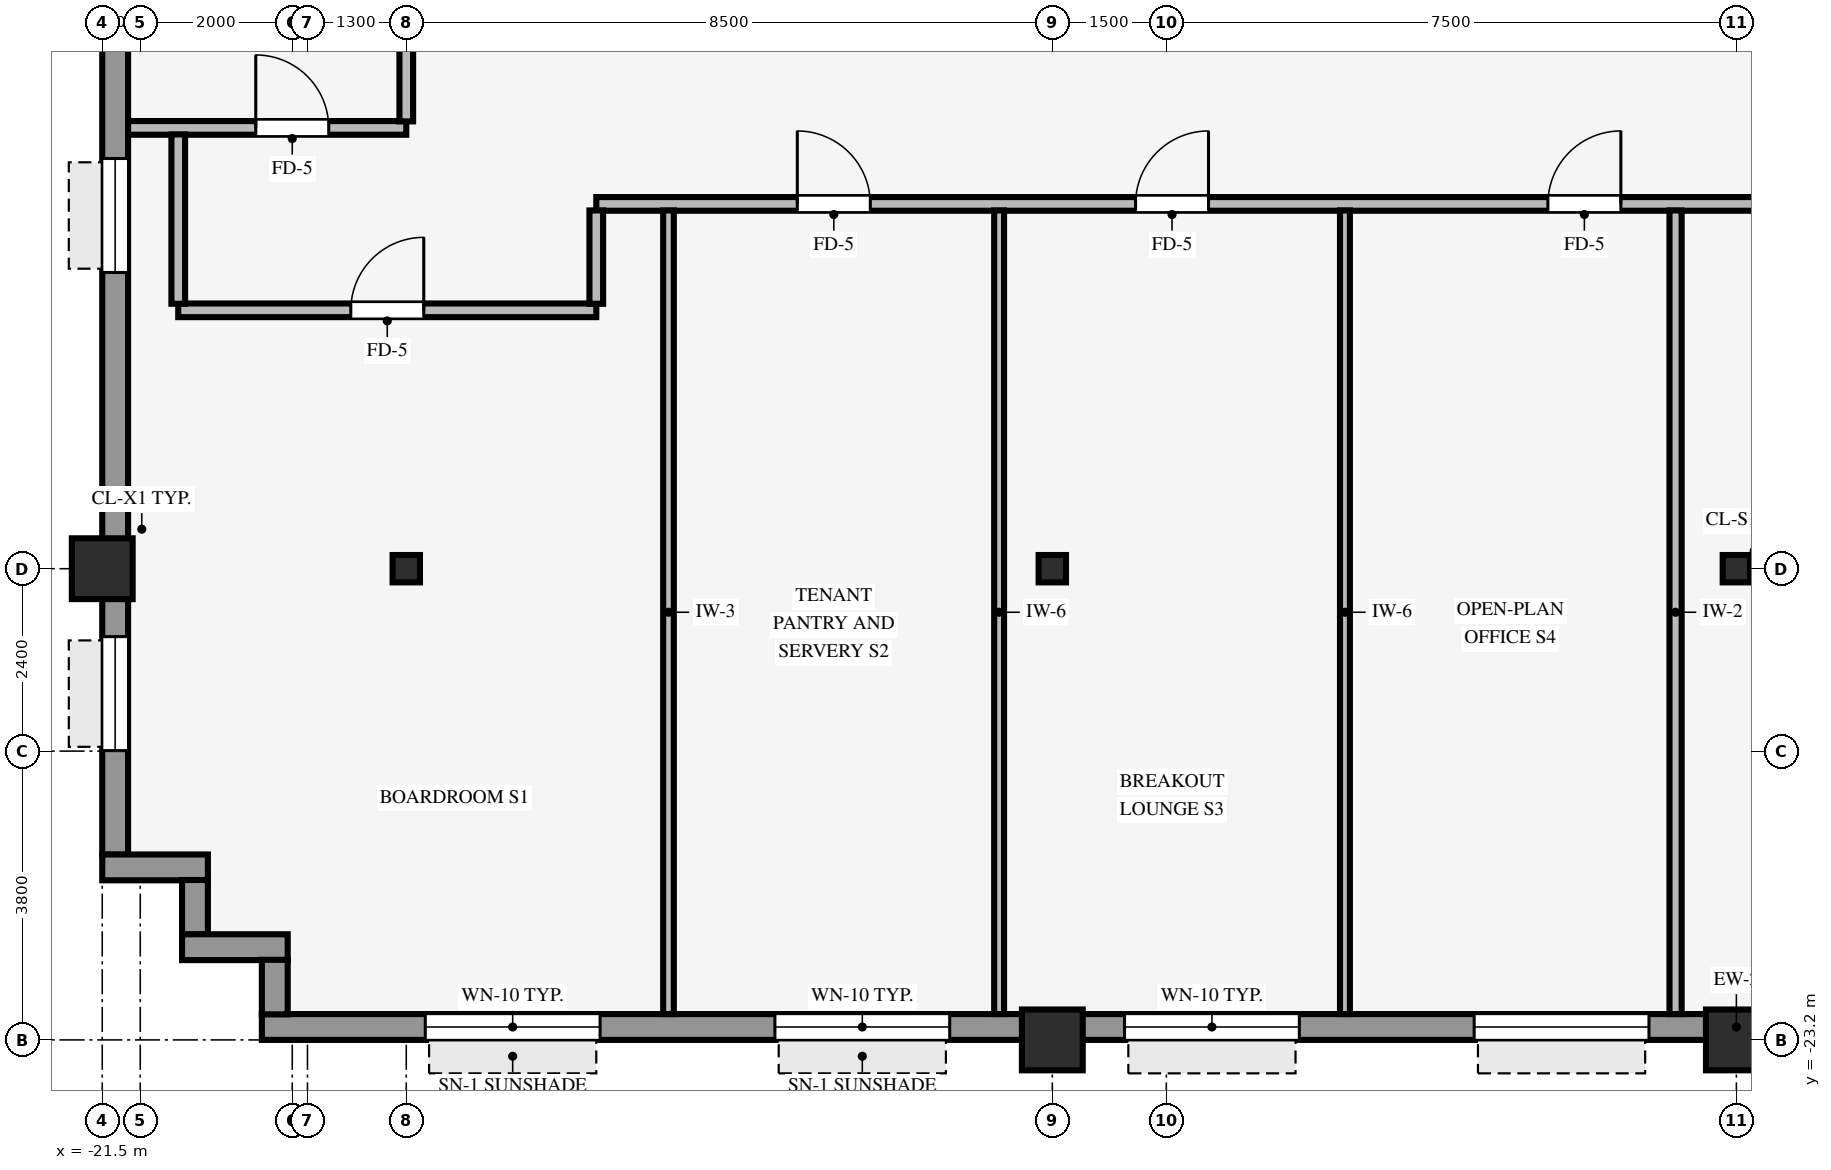
"""IFC4 building model, lengths in metres.
Left out: names, types, materials, properties, quantities, classifications, styles, units other than length and angle.
Written with IfcOpenShell. Run it as: python <this file> out.ifc"""

import sys

from ifc_helpers import new_model, si_unit, direction, frame, frame_2d, origin, origin_2d, place, context, subcontext, project, spatial, rectangle, hollow_rectangle, i_section, extrude, source, transform, mapped, element, fill, save


model = new_model("IFC4")
c1 = context("Model", 3, precision=1e-05, world=origin(), true_north=direction((0.0, 1.0)))
c2 = subcontext(c1, "Body", "Model", "MODEL_VIEW")
j1 = project(units=[si_unit("LENGTHUNIT", "METRE"), si_unit("PLANEANGLEUNIT", "RADIAN")], contexts=[c1])
p1 = place(None, origin())
s1 = spatial("IfcSite", under=j1, at=p1, CompositionType="ELEMENT")
p2 = place(p1, origin())
s2 = spatial("IfcBuilding", under=s1, at=p2, CompositionType="ELEMENT")
p3 = place(p2, frame((0.0, 0.0, 75.05)))
s3 = spatial("IfcBuildingStorey", under=s2, at=p3, CompositionType="ELEMENT", Elevation=75.05)
for number, where, z_axis, x_axis in (
    (1, (-21.5, -17.0, 0.0), (0.0, 0.0, 1.0), (1.0, 0.0, 0.0)),
    (2, (-9.0, -23.2, 0.0), (0.0, 0.0, 1.0), (1.0, 0.0, 0.0)),
    (3, (0.0, -23.2, 0.0), (0.0, 0.0, 1.0), (1.0, 0.0, 0.0)),
):
    element("IfcColumn", number, at=place(p3, frame(where, z_axis=z_axis, x_axis=x_axis)), inside=s3, PredefinedType="COLUMN", context=c2, shape_type="SweptSolid", body=[
        extrude(hollow_rectangle(XDim=0.8, YDim=0.8, WallThickness=0.055, InnerFilletRadius=0.055, OuterFilletRadius=0.11, at=origin_2d()), origin(), (0.0, 0.0, 1.0), 3.37),
    ])
for number, where, z_axis, x_axis in (
    (4, (0.0, -17.0, 0.0), (0.0, 0.0, 1.0), (1.0, 0.0, 0.0)),
    (5, (-17.5, -17.0, 0.0), (0.0, 0.0, 1.0), (1.0, 0.0, 0.0)),
    (6, (-9.0, -17.0, 0.0), (0.0, 0.0, 1.0), (1.0, 0.0, 0.0)),
):
    element("IfcColumn", number, at=place(p3, frame(where, z_axis=z_axis, x_axis=x_axis)), inside=s3, PredefinedType="COLUMN", context=c2, shape_type="SweptSolid", body=[
        extrude(i_section(OverallWidth=0.36, OverallDepth=0.36, WebThickness=0.021, FlangeThickness=0.021, FilletRadius=0.018, at=origin_2d()), origin(), (0.0, 0.0, 1.0), 3.37),
    ])
p4 = place(p3, frame((-19.4, -23.03, 0.0), z_axis=(0.0, 0.0, 1.0), x_axis=(1.0, 0.0, 0.0)))
e7 = element("IfcWall", 7, at=p4, inside=s3, PredefinedType="STANDARD", context=c2, shape_type="SweptSolid", body=[
    extrude(rectangle(XDim=38.8, YDim=0.34, at=frame_2d((19.4, 0.0))), origin(), (0.0, 0.0, 1.0), 2.705),
])
p5 = place(p4, frame((2.15, 0.0, 0.8)))
e8 = element("IfcOpeningElement", 8, at=p5, cuts=e7, PredefinedType="OPENING", context=c2, shape_type="SweptSolid", body=[
    extrude(rectangle(XDim=2.3, YDim=1.62, at=frame_2d((1.15, 0.81))), frame((0.0, 0.18, 0.0), z_axis=(0.0, -1.0, 0.0), x_axis=(1.0, 0.0, 0.0)), (0.0, 0.0, 1.0), 0.36),
])
p6 = place(p4, frame((6.75, 0.0, 0.8)))
e9 = element("IfcOpeningElement", 9, at=p6, cuts=e7, PredefinedType="OPENING", context=c2, shape_type="SweptSolid", body=[
    extrude(rectangle(XDim=2.3, YDim=1.62, at=frame_2d((1.15, 0.81))), frame((0.0, 0.18, 0.0), z_axis=(0.0, -1.0, 0.0), x_axis=(1.0, 0.0, 0.0)), (0.0, 0.0, 1.0), 0.36),
])
p7 = place(p4, frame((11.35, 0.0, 0.8)))
e10 = element("IfcOpeningElement", 10, at=p7, cuts=e7, PredefinedType="OPENING", context=c2, shape_type="SweptSolid", body=[
    extrude(rectangle(XDim=2.3, YDim=1.62, at=frame_2d((1.15, 0.81))), frame((0.0, 0.18, 0.0), z_axis=(0.0, -1.0, 0.0), x_axis=(1.0, 0.0, 0.0)), (0.0, 0.0, 1.0), 0.36),
])
p8 = place(p4, frame((15.95, 0.0, 0.8)))
e11 = element("IfcOpeningElement", 11, at=p8, cuts=e7, PredefinedType="OPENING", context=c2, shape_type="SweptSolid", body=[
    extrude(rectangle(XDim=2.3, YDim=1.62, at=frame_2d((1.15, 0.81))), frame((0.0, 0.18, 0.0), z_axis=(0.0, -1.0, 0.0), x_axis=(1.0, 0.0, 0.0)), (0.0, 0.0, 1.0), 0.36),
])
p9 = place(p4, frame((20.55, 0.0, 0.8)))
e12 = element("IfcOpeningElement", 12, at=p9, cuts=e7, PredefinedType="OPENING", context=c2, shape_type="SweptSolid", body=[
    extrude(rectangle(XDim=2.3, YDim=1.62, at=frame_2d((1.15, 0.81))), frame((0.0, 0.18, 0.0), z_axis=(0.0, -1.0, 0.0), x_axis=(1.0, 0.0, 0.0)), (0.0, 0.0, 1.0), 0.36),
])
p10 = place(p4, frame((25.15, 0.0, 0.8)))
e13 = element("IfcOpeningElement", 13, at=p10, cuts=e7, PredefinedType="OPENING", context=c2, shape_type="SweptSolid", body=[
    extrude(rectangle(XDim=2.3, YDim=1.62, at=frame_2d((1.15, 0.81))), frame((0.0, 0.18, 0.0), z_axis=(0.0, -1.0, 0.0), x_axis=(1.0, 0.0, 0.0)), (0.0, 0.0, 1.0), 0.36),
])
p11 = place(p4, frame((33.45, 0.0, 0.8)))
e14 = element("IfcOpeningElement", 14, at=p11, cuts=e7, PredefinedType="OPENING", context=c2, shape_type="SweptSolid", body=[
    extrude(rectangle(XDim=2.3, YDim=1.62, at=frame_2d((1.15, 0.81))), frame((0.0, 0.18, 0.0), z_axis=(0.0, -1.0, 0.0), x_axis=(1.0, 0.0, 0.0)), (0.0, 0.0, 1.0), 0.36),
])
p12 = place(p3, frame((-21.33, -20.764, 0.0), z_axis=(0.0, 0.0, 1.0), x_axis=(0.0, 1.0, 0.0)))
e15 = element("IfcWall", 15, at=p12, inside=s3, PredefinedType="STANDARD", context=c2, shape_type="SweptSolid", body=[
    extrude(rectangle(XDim=41.528, YDim=0.34, at=frame_2d((20.764, 0.0))), origin(), (0.0, 0.0, 1.0), 2.705),
])
p13 = place(p12, frame((15.464, 0.0, 0.0)))
e16 = element("IfcOpeningElement", 16, at=p13, cuts=e15, PredefinedType="OPENING", context=c2, shape_type="SweptSolid", body=[
    extrude(rectangle(XDim=0.98, YDim=2.15, at=frame_2d((0.49, 1.075))), frame((0.0, 0.18, 0.0), z_axis=(0.0, -1.0, 0.0), x_axis=(1.0, 0.0, 0.0)), (0.0, 0.0, 1.0), 0.36),
])
p14 = place(p12, frame((1.371, 0.0, 0.8)))
e17 = element("IfcOpeningElement", 17, at=p14, cuts=e15, PredefinedType="OPENING", context=c2, shape_type="SweptSolid", body=[
    extrude(rectangle(XDim=1.5, YDim=1.6, at=frame_2d((0.75, 0.8))), frame((0.0, 0.18, 0.0), z_axis=(0.0, -1.0, 0.0), x_axis=(1.0, 0.0, 0.0)), (0.0, 0.0, 1.0), 0.36),
])
p15 = place(p12, frame((7.662, 0.0, 0.8)))
e18 = element("IfcOpeningElement", 18, at=p15, cuts=e15, PredefinedType="OPENING", context=c2, shape_type="SweptSolid", body=[
    extrude(rectangle(XDim=1.5, YDim=1.6, at=frame_2d((0.75, 0.8))), frame((0.0, 0.18, 0.0), z_axis=(0.0, -1.0, 0.0), x_axis=(1.0, 0.0, 0.0)), (0.0, 0.0, 1.0), 0.36),
])
p16 = place(p12, frame((12.603, 0.0, 0.8)))
e19 = element("IfcOpeningElement", 19, at=p16, cuts=e15, PredefinedType="OPENING", context=c2, shape_type="SweptSolid", body=[
    extrude(rectangle(XDim=1.5, YDim=1.6, at=frame_2d((0.75, 0.8))), frame((0.0, 0.18, 0.0), z_axis=(0.0, -1.0, 0.0), x_axis=(1.0, 0.0, 0.0)), (0.0, 0.0, 1.0), 0.36),
])
p17 = place(p12, frame((22.485, 0.0, 0.8)))
e20 = element("IfcOpeningElement", 20, at=p17, cuts=e15, PredefinedType="OPENING", context=c2, shape_type="SweptSolid", body=[
    extrude(rectangle(XDim=1.5, YDim=1.6, at=frame_2d((0.75, 0.8))), frame((0.0, 0.18, 0.0), z_axis=(0.0, -1.0, 0.0), x_axis=(1.0, 0.0, 0.0)), (0.0, 0.0, 1.0), 0.36),
])
p18 = place(p12, frame((27.426, 0.0, 0.8)))
e21 = element("IfcOpeningElement", 21, at=p18, cuts=e15, PredefinedType="OPENING", context=c2, shape_type="SweptSolid", body=[
    extrude(rectangle(XDim=1.5, YDim=1.6, at=frame_2d((0.75, 0.8))), frame((0.0, 0.18, 0.0), z_axis=(0.0, -1.0, 0.0), x_axis=(1.0, 0.0, 0.0)), (0.0, 0.0, 1.0), 0.36),
])
p19 = place(p12, frame((32.366, 0.0, 0.8)))
e22 = element("IfcOpeningElement", 22, at=p19, cuts=e15, PredefinedType="OPENING", context=c2, shape_type="SweptSolid", body=[
    extrude(rectangle(XDim=1.5, YDim=1.6, at=frame_2d((0.75, 0.8))), frame((0.0, 0.18, 0.0), z_axis=(0.0, -1.0, 0.0), x_axis=(1.0, 0.0, 0.0)), (0.0, 0.0, 1.0), 0.36),
])
p20 = place(p12, frame((38.657, 0.0, 0.8)))
e23 = element("IfcOpeningElement", 23, at=p20, cuts=e15, PredefinedType="OPENING", context=c2, shape_type="SweptSolid", body=[
    extrude(rectangle(XDim=1.5, YDim=1.6, at=frame_2d((0.75, 0.8))), frame((0.0, 0.18, 0.0), z_axis=(0.0, -1.0, 0.0), x_axis=(1.0, 0.0, 0.0)), (0.0, 0.0, 1.0), 0.36),
])
p21 = place(p3, frame((-21.5, -20.93, 0.0), z_axis=(0.0, 0.0, 1.0), x_axis=(1.0, 0.0, 0.0)))
e24 = element("IfcWall", 24, at=p21, inside=s3, PredefinedType="STANDARD", context=c2, shape_type="SweptSolid", body=[
    extrude(rectangle(XDim=1.39, YDim=0.34, at=frame_2d((0.695, 0.0))), origin(), (0.0, 0.0, 1.0), 3.36),
])
p22 = place(p3, frame((-20.28, -21.814, 0.0), z_axis=(0.0, 0.0, 1.0), x_axis=(0.0, 1.0, 0.0)))
e25 = element("IfcWall", 25, at=p22, inside=s3, PredefinedType="STANDARD", context=c2, shape_type="SweptSolid", body=[
    extrude(rectangle(XDim=0.718, YDim=0.34, at=frame_2d((0.359, 0.0))), origin(), (0.0, 0.0, 1.0), 3.36),
])
p23 = place(p3, frame((-20.45, -21.98, 0.0), z_axis=(0.0, 0.0, 1.0), x_axis=(1.0, 0.0, 0.0)))
e26 = element("IfcWall", 26, at=p23, inside=s3, PredefinedType="STANDARD", context=c2, shape_type="SweptSolid", body=[
    extrude(rectangle(XDim=1.39, YDim=0.34, at=frame_2d((0.695, 0.0))), origin(), (0.0, 0.0, 1.0), 3.36),
])
p24 = place(p3, frame((-19.23, -22.864, 0.0), z_axis=(0.0, 0.0, 1.0), x_axis=(0.0, 1.0, 0.0)))
e27 = element("IfcWall", 27, at=p24, inside=s3, PredefinedType="STANDARD", context=c2, shape_type="SweptSolid", body=[
    extrude(rectangle(XDim=0.718, YDim=0.34, at=frame_2d((0.359, 0.0))), origin(), (0.0, 0.0, 1.0), 3.36),
])
p25 = place(p3, frame((-20.5, -13.6, 0.0), z_axis=(0.0, 0.0, 1.0), x_axis=(1.0, 0.0, 0.0)))
e28 = element("IfcWall", 28, at=p25, inside=s3, PredefinedType="PARTITIONING", context=c2, shape_type="SweptSolid", body=[
    extrude(rectangle(XDim=5.5, YDim=0.18, at=frame_2d((2.75, 0.0))), origin(), (0.0, 0.0, 1.0), 2.942),
])
p26 = place(p25, frame((2.27, 0.0, 0.0)))
e29 = element("IfcOpeningElement", 29, at=p26, cuts=e28, PredefinedType="OPENING", context=c2, shape_type="SweptSolid", body=[
    extrude(rectangle(XDim=0.96, YDim=2.1, at=frame_2d((0.48, 1.05))), frame((0.0, 0.1, 0.0), z_axis=(0.0, -1.0, 0.0), x_axis=(1.0, 0.0, 0.0)), (0.0, 0.0, 1.0), 0.2),
])
p27 = place(p3, frame((-15.0, -12.2, 0.0), z_axis=(0.0, 0.0, 1.0), x_axis=(1.0, 0.0, 0.0)))
e30 = element("IfcWall", 30, at=p27, inside=s3, PredefinedType="PARTITIONING", context=c2, shape_type="SweptSolid", body=[
    extrude(rectangle(XDim=30.0, YDim=0.18, at=frame_2d((15.0, 0.0))), origin(), (0.0, 0.0, 1.0), 3.36),
])
p28 = place(p27, frame((23.31, 0.0, 0.0)))
e31 = element("IfcOpeningElement", 31, at=p28, cuts=e30, PredefinedType="OPENING", context=c2, shape_type="SweptSolid", body=[
    extrude(rectangle(XDim=0.96, YDim=2.1, at=frame_2d((0.48, 1.05))), frame((0.0, 0.1, 0.0), z_axis=(0.0, -1.0, 0.0), x_axis=(1.0, 0.0, 0.0)), (0.0, 0.0, 1.0), 0.2),
])
p29 = place(p27, frame((16.73, 0.0, 0.0)))
e32 = element("IfcOpeningElement", 32, at=p29, cuts=e30, PredefinedType="OPENING", context=c2, shape_type="SweptSolid", body=[
    extrude(rectangle(XDim=0.96, YDim=2.1, at=frame_2d((0.48, 1.05))), frame((0.0, 0.1, 0.0), z_axis=(0.0, -1.0, 0.0), x_axis=(1.0, 0.0, 0.0)), (0.0, 0.0, 1.0), 0.2),
])
p30 = place(p27, frame((7.095, 0.0, 0.0)))
e33 = element("IfcOpeningElement", 33, at=p30, cuts=e30, PredefinedType="OPENING", context=c2, shape_type="SweptSolid", body=[
    extrude(rectangle(XDim=0.96, YDim=2.1, at=frame_2d((0.48, 1.05))), frame((0.0, 0.1, 0.0), z_axis=(0.0, -1.0, 0.0), x_axis=(1.0, 0.0, 0.0)), (0.0, 0.0, 1.0), 0.2),
])
p31 = place(p27, frame((2.645, 0.0, 0.0)))
e34 = element("IfcOpeningElement", 34, at=p31, cuts=e30, PredefinedType="OPENING", context=c2, shape_type="SweptSolid", body=[
    extrude(rectangle(XDim=0.96, YDim=2.1, at=frame_2d((0.48, 1.05))), frame((0.0, 0.1, 0.0), z_axis=(0.0, -1.0, 0.0), x_axis=(1.0, 0.0, 0.0)), (0.0, 0.0, 1.0), 0.2),
])
p32 = place(p27, frame((28.2, 0.0, 0.0)))
e35 = element("IfcOpeningElement", 35, at=p32, cuts=e30, PredefinedType="OPENING", context=c2, shape_type="SweptSolid", body=[
    extrude(rectangle(XDim=0.96, YDim=2.1, at=frame_2d((0.48, 1.05))), frame((0.0, 0.1, 0.0), z_axis=(0.0, -1.0, 0.0), x_axis=(1.0, 0.0, 0.0)), (0.0, 0.0, 1.0), 0.2),
])
p33 = place(p27, frame((12.52, 0.0, 0.0)))
e36 = element("IfcOpeningElement", 36, at=p33, cuts=e30, PredefinedType="OPENING", context=c2, shape_type="SweptSolid", body=[
    extrude(rectangle(XDim=0.96, YDim=2.1, at=frame_2d((0.48, 1.05))), frame((0.0, 0.1, 0.0), z_axis=(0.0, -1.0, 0.0), x_axis=(1.0, 0.0, 0.0)), (0.0, 0.0, 1.0), 0.2),
])
p34 = place(p3, frame((-21.16, -11.2, 0.0), z_axis=(0.0, 0.0, 1.0), x_axis=(1.0, 0.0, 0.0)))
e37 = element("IfcWall", 37, at=p34, inside=s3, PredefinedType="PARTITIONING", context=c2, shape_type="SweptSolid", body=[
    extrude(rectangle(XDim=3.66, YDim=0.18, at=frame_2d((1.83, 0.0))), origin(), (0.0, 0.0, 1.0), 3.36),
])
p35 = place(p34, frame((1.68, 0.0, 0.0)))
e38 = element("IfcOpeningElement", 38, at=p35, cuts=e37, PredefinedType="OPENING", context=c2, shape_type="SweptSolid", body=[
    extrude(rectangle(XDim=0.96, YDim=2.1, at=frame_2d((0.48, 1.05))), frame((0.0, 0.1, 0.0), z_axis=(0.0, -1.0, 0.0), x_axis=(1.0, 0.0, 0.0)), (0.0, 0.0, 1.0), 0.2),
])
p36 = place(p3, frame((-20.5, -13.514, 0.0), z_axis=(0.0, 0.0, 1.0), x_axis=(0.0, 1.0, 0.0)))
e39 = element("IfcWall", 39, at=p36, inside=s3, PredefinedType="PARTITIONING", context=c2, shape_type="SweptSolid", body=[
    extrude(rectangle(XDim=2.228, YDim=0.18, at=frame_2d((1.114, 0.0))), origin(), (0.0, 0.0, 1.0), 3.36),
])
p37 = place(p3, frame((-17.5, -11.114, 0.0), z_axis=(0.0, 0.0, 1.0), x_axis=(0.0, 1.0, 0.0)))
e40 = element("IfcWall", 40, at=p37, inside=s3, PredefinedType="PARTITIONING", context=c2, shape_type="SweptSolid", body=[
    extrude(rectangle(XDim=0.968, YDim=0.18, at=frame_2d((0.484, 0.0))), origin(), (0.0, 0.0, 1.0), 2.738),
])
p38 = place(p3, frame((-15.0, -13.514, 0.0), z_axis=(0.0, 0.0, 1.0), x_axis=(0.0, 1.0, 0.0)))
e41 = element("IfcWall", 41, at=p38, inside=s3, PredefinedType="PARTITIONING", context=c2, shape_type="SweptSolid", body=[
    extrude(rectangle(XDim=1.228, YDim=0.18, at=frame_2d((0.614, 0.0))), origin(), (0.0, 0.0, 1.0), 3.36),
])
p39 = place(p3, frame((-14.05, -22.86, 0.0), z_axis=(0.0, 0.0, 1.0), x_axis=(0.0, 1.0, 0.0)))
e42 = element("IfcWall", 42, at=p39, inside=s3, PredefinedType="PARTITIONING", context=c2, shape_type="SweptSolid", body=[
    extrude(rectangle(XDim=10.574, YDim=0.14, at=frame_2d((5.287, 0.0))), origin(), (0.0, 0.0, 1.0), 3.36),
])
for number, where, z_axis, x_axis in (
    (43, (-9.7, -22.86, 0.0), (0.0, 0.0, 1.0), (0.0, 1.0, 0.0)),
    (44, (-5.15, -22.86, 0.0), (0.0, 0.0, 1.0), (0.0, 1.0, 0.0)),
):
    element("IfcWall", number, at=place(p3, frame(where, z_axis=z_axis, x_axis=x_axis)), inside=s3, PredefinedType="PARTITIONING", context=c2, shape_type="SweptSolid", body=[
        extrude(rectangle(XDim=10.574, YDim=0.13, at=frame_2d((5.287, 0.0))), origin(), (0.0, 0.0, 1.0), 3.36),
    ])
p40 = place(p3, frame((-0.8, -22.86, 0.0), z_axis=(0.0, 0.0, 1.0), x_axis=(0.0, 1.0, 0.0)))
e45 = element("IfcWall", 45, at=p40, inside=s3, PredefinedType="PARTITIONING", context=c2, shape_type="SweptSolid", body=[
    extrude(rectangle(XDim=10.574, YDim=0.16, at=frame_2d((5.287, 0.0))), origin(), (0.0, 0.0, 1.0), 3.36),
])
m1 = source(origin(), c2, "Body", "SweptSolid", [
    extrude(rectangle(XDim=2.3, YDim=1.62, at=frame_2d((1.15, 0.81))), frame((0.0, 0.03, 0.0), z_axis=(0.0, -1.0, 0.0), x_axis=(1.0, 0.0, 0.0)), (0.0, 0.0, 1.0), 0.06),
])
p41 = place(p5, origin())
e46 = element("IfcWindow", 46, at=p41, inside=s3, PartitioningType="SINGLE_PANEL", PredefinedType="WINDOW", context=c2, shape_type="MappedRepresentation", body=[
    mapped(m1, transform((0.0, 0.0, 0.0), scale=1.0)),
])
fill(e8, e46)
p42 = place(p6, origin())
e47 = element("IfcWindow", 47, at=p42, inside=s3, PartitioningType="SINGLE_PANEL", PredefinedType="WINDOW", context=c2, shape_type="MappedRepresentation", body=[
    mapped(m1, transform((0.0, 0.0, 0.0), scale=1.0)),
])
fill(e9, e47)
p43 = place(p7, origin())
e48 = element("IfcWindow", 48, at=p43, inside=s3, PartitioningType="SINGLE_PANEL", PredefinedType="WINDOW", context=c2, shape_type="MappedRepresentation", body=[
    mapped(m1, transform((0.0, 0.0, 0.0), scale=1.0)),
])
fill(e10, e48)
p44 = place(p8, origin())
e49 = element("IfcWindow", 49, at=p44, inside=s3, PartitioningType="SINGLE_PANEL", PredefinedType="WINDOW", context=c2, shape_type="MappedRepresentation", body=[
    mapped(m1, transform((0.0, 0.0, 0.0), scale=1.0)),
])
fill(e11, e49)
m2 = source(origin(), c2, "Body", "SweptSolid", [
    extrude(rectangle(XDim=1.5, YDim=1.6, at=frame_2d((0.75, 0.8))), frame((0.0, 0.03, 0.0), z_axis=(0.0, -1.0, 0.0), x_axis=(1.0, 0.0, 0.0)), (0.0, 0.0, 1.0), 0.06),
])
p45 = place(p14, origin())
e50 = element("IfcWindow", 50, at=p45, inside=s3, PartitioningType="SINGLE_PANEL", PredefinedType="WINDOW", context=c2, shape_type="MappedRepresentation", body=[
    mapped(m2, transform((0.0, 0.0, 0.0), scale=1.0)),
])
fill(e17, e50)
p46 = place(p15, origin())
e51 = element("IfcWindow", 51, at=p46, inside=s3, PartitioningType="SINGLE_PANEL", PredefinedType="WINDOW", context=c2, shape_type="MappedRepresentation", body=[
    mapped(m2, transform((0.0, 0.0, 0.0), scale=1.0)),
])
fill(e18, e51)
m3 = source(origin(), c2, "Body", "SweptSolid", [
    extrude(rectangle(XDim=0.96, YDim=2.1, at=frame_2d((0.48, 1.05))), frame((0.0, 0.025, 0.0), z_axis=(0.0, -1.0, 0.0), x_axis=(1.0, 0.0, 0.0)), (0.0, 0.0, 1.0), 0.05),
])
p47 = place(p26, origin())
e52 = element("IfcDoor", 52, at=p47, inside=s3, OperationType="SINGLE_SWING_RIGHT", PredefinedType="DOOR", context=c2, shape_type="MappedRepresentation", body=[
    mapped(m3, transform((0.0, 0.0, 0.0), scale=1.0)),
])
fill(e29, e52)
p48 = place(p30, origin())
e53 = element("IfcDoor", 53, at=p48, inside=s3, OperationType="SINGLE_SWING_RIGHT", PredefinedType="DOOR", context=c2, shape_type="MappedRepresentation", body=[
    mapped(m3, transform((0.0, 0.0, 0.0), scale=1.0)),
])
fill(e33, e53)
p49 = place(p31, origin())
e54 = element("IfcDoor", 54, at=p49, inside=s3, OperationType="SINGLE_SWING_LEFT", PredefinedType="DOOR", context=c2, shape_type="MappedRepresentation", body=[
    mapped(m3, transform((0.0, 0.0, 0.0), scale=1.0)),
])
fill(e34, e54)
p50 = place(p35, origin())
e55 = element("IfcDoor", 55, at=p50, inside=s3, OperationType="SINGLE_SWING_LEFT", PredefinedType="DOOR", context=c2, shape_type="MappedRepresentation", body=[
    mapped(m3, transform((0.0, 0.0, 0.0), scale=1.0)),
])
fill(e38, e55)
p51 = place(p33, origin())
e56 = element("IfcDoor", 56, at=p51, inside=s3, OperationType="SINGLE_SWING_RIGHT", PredefinedType="DOOR", context=c2, shape_type="MappedRepresentation", body=[
    mapped(m3, transform((0.0, 0.0, 0.0), scale=1.0)),
])
fill(e36, e56)
save(model, sys.argv[1])
